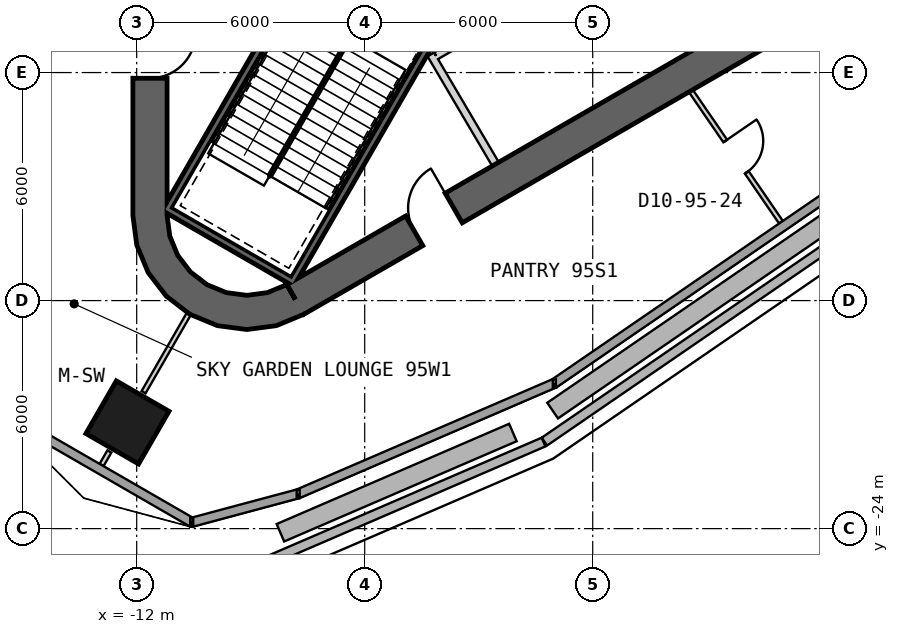
"""IFC4 building model, lengths in metres.
Left out: names, types, materials, properties, quantities, classifications, styles, units other than length and angle.
Written with IfcOpenShell. Run it as: python <this file> out.ifc"""

import sys

from ifc_helpers import new_model, si_unit, direction, frame, frame_2d, origin, origin_2d, place, context, subcontext, project, spatial, polyline, rectangle, outline, extrude, element, fill, save


model = new_model("IFC4")
c1 = context("Model", 3, precision=1e-05, world=origin(), true_north=direction((0.0, 1.0)))
c2 = subcontext(c1, "Body", "Model", "MODEL_VIEW")
j1 = project(units=[si_unit("LENGTHUNIT", "METRE"), si_unit("PLANEANGLEUNIT", "RADIAN")], contexts=[c1])
p1 = place(None, origin())
s1 = spatial("IfcSite", under=j1, at=p1, CompositionType="ELEMENT")
p2 = place(p1, origin())
s2 = spatial("IfcBuilding", under=s1, at=p2, CompositionType="ELEMENT")
p3 = place(p2, frame((0.0, 0.0, 420.3)))
s3 = spatial("IfcBuildingStorey", under=s2, at=p3, CompositionType="ELEMENT", Elevation=420.3)
p4 = place(p3, frame((-12.243, -21.206, -0.25), z_axis=(0.0, 0.0, 1.0), x_axis=(-0.5, -0.866025403784, 0.0)))
e1 = element("IfcColumn", 1, at=p4, inside=s3, PredefinedType="COLUMN", context=c2, shape_type="SweptSolid", body=[
    extrude(rectangle(XDim=1.6, YDim=1.6, at=origin_2d()), origin(), (0.0, 0.0, 1.0), 5.0),
])
p5 = place(p3, frame((-11.65, 15.762, 0.0), z_axis=(0.0, 0.0, 1.0), x_axis=(0.0, -1.0, 0.0)))
e2 = element("IfcWall", 2, at=p5, inside=s3, PredefinedType="SHEAR", context=c2, shape_type="SweptSolid", body=[
    extrude(rectangle(XDim=31.523, YDim=0.9, at=frame_2d((15.762, 0.0))), origin(), (0.0, 0.0, 1.0), 5.0),
])
p6 = place(p5, frame((3.612, 0.0, 0.0)))
e3 = element("IfcOpeningElement", 3, at=p6, cuts=e2, PredefinedType="OPENING", context=c2, shape_type="SweptSolid", body=[
    extrude(rectangle(XDim=1.2, YDim=2.4, at=frame_2d((0.6, 1.2))), frame((0.0, 0.46, 0.0), z_axis=(0.0, -1.0, 0.0), x_axis=(1.0, 0.0, 0.0)), (0.0, 0.0, 1.0), 0.92),
])
p7 = place(p5, frame((26.712, 0.0, 0.0)))
e4 = element("IfcOpeningElement", 4, at=p7, cuts=e2, PredefinedType="OPENING", context=c2, shape_type="SweptSolid", body=[
    extrude(rectangle(XDim=1.2, YDim=2.4, at=frame_2d((0.6, 1.2))), frame((0.0, 0.46, 0.0), z_axis=(0.0, -1.0, 0.0), x_axis=(1.0, 0.0, 0.0)), (0.0, 0.0, 1.0), 0.92),
])
p8 = place(p3, frame((-7.825, -17.97, 0.0), z_axis=(0.0, 0.0, 1.0), x_axis=(0.866028369851, 0.499994862586, 0.0)))
e5 = element("IfcWall", 5, at=p8, inside=s3, PredefinedType="SHEAR", context=c2, shape_type="SweptSolid", body=[
    extrude(rectangle(XDim=31.523, YDim=0.9, at=frame_2d((15.762, 0.0))), origin(), (0.0, 0.0, 1.0), 5.0),
])
p9 = place(p8, frame((17.862, 0.0, 0.0)))
e6 = element("IfcOpeningElement", 6, at=p9, cuts=e5, PredefinedType="OPENING", context=c2, shape_type="SweptSolid", body=[
    extrude(rectangle(XDim=1.2, YDim=2.4, at=frame_2d((0.6, 1.2))), frame((0.0, 0.46, 0.0), z_axis=(0.0, -1.0, 0.0), x_axis=(1.0, 0.0, 0.0)), (0.0, 0.0, 1.0), 0.92),
])
p10 = place(p8, frame((20.562, 0.0, 0.0)))
e7 = element("IfcOpeningElement", 7, at=p10, cuts=e5, PredefinedType="OPENING", context=c2, shape_type="SweptSolid", body=[
    extrude(rectangle(XDim=1.2, YDim=2.4, at=frame_2d((0.6, 1.2))), frame((0.0, 0.46, 0.0), z_axis=(0.0, -1.0, 0.0), x_axis=(1.0, 0.0, 0.0)), (0.0, 0.0, 1.0), 0.92),
])
p11 = place(p8, frame((26.712, 0.0, 0.0)))
e8 = element("IfcOpeningElement", 8, at=p11, cuts=e5, PredefinedType="OPENING", context=c2, shape_type="SweptSolid", body=[
    extrude(rectangle(XDim=1.2, YDim=2.4, at=frame_2d((0.6, 1.2))), frame((0.0, 0.46, 0.0), z_axis=(0.0, -1.0, 0.0), x_axis=(1.0, 0.0, 0.0)), (0.0, 0.0, 1.0), 0.92),
])
p12 = place(p8, frame((3.612, 0.0, 0.0)))
e9 = element("IfcOpeningElement", 9, at=p12, cuts=e5, PredefinedType="OPENING", context=c2, shape_type="SweptSolid", body=[
    extrude(rectangle(XDim=1.2, YDim=2.4, at=frame_2d((0.6, 1.2))), frame((0.0, 0.46, 0.0), z_axis=(0.0, -1.0, 0.0), x_axis=(1.0, 0.0, 0.0)), (0.0, 0.0, 1.0), 0.92),
])
p13 = place(p3, origin())
e10 = element("IfcWall", 10, at=p13, inside=s3, PredefinedType="SHEAR", context=c2, shape_type="SweptSolid", body=[
    extrude(outline(polyline([(-12.1, -15.762), (-11.998, -16.538), (-11.698, -17.262), (-11.221, -17.883), (-10.6, -18.36), (-9.876, -18.659), (-9.1, -18.762), (-8.323, -18.659), (-7.6, -18.36), (-8.05, -17.58), (-8.556, -17.79), (-9.1, -17.862), (-9.644, -17.79), (-10.15, -17.58), (-10.585, -17.247), (-10.919, -16.812), (-11.128, -16.305), (-11.2, -15.762), (-12.1, -15.762)])), origin(), (0.0, 0.0, 1.0), 5.0),
])
p14 = place(p3, frame((-15.365, -21.056, 0.0), z_axis=(0.0, 0.0, 1.0), x_axis=(0.866034164019, -0.499984826521, 0.0)))
e11 = element("IfcWall", 11, at=p14, inside=s3, PredefinedType="SOLIDWALL", context=c2, shape_type="SweptSolid", body=[
    extrude(rectangle(XDim=5.558, YDim=0.24, at=frame_2d((2.779, 0.0))), origin(), (0.0, 0.0, 1.0), 4.75),
])
p15 = place(p3, frame((-10.552, -23.834, 0.0), z_axis=(0.0, 0.0, 1.0), x_axis=(0.965914229844, 0.258862319746, 0.0)))
e12 = element("IfcWall", 12, at=p15, inside=s3, PredefinedType="SOLIDWALL", context=c2, shape_type="SweptSolid", body=[
    extrude(rectangle(XDim=2.9, YDim=0.24, at=frame_2d((1.45, 0.0))), origin(), (0.0, 0.0, 1.0), 4.75),
])
p16 = place(p3, frame((-7.751, -23.084, 0.0), z_axis=(0.0, 0.0, 1.0), x_axis=(0.918310328203, 0.395861264986, 0.0)))
e13 = element("IfcWall", 13, at=p16, inside=s3, PredefinedType="SOLIDWALL", context=c2, shape_type="SweptSolid", body=[
    extrude(rectangle(XDim=7.34, YDim=0.24, at=frame_2d((3.67, 0.0))), origin(), (0.0, 0.0, 1.0), 4.75),
])
p17 = place(p3, frame((-1.01, -20.178, 0.0), z_axis=(0.0, 0.0, 1.0), x_axis=(0.824477208683, 0.565895160221, 0.0)))
e14 = element("IfcWall", 14, at=p17, inside=s3, PredefinedType="SOLIDWALL", context=c2, shape_type="SweptSolid", body=[
    extrude(rectangle(XDim=21.999, YDim=0.24, at=frame_2d((11.0, 0.0))), origin(), (0.0, 0.0, 1.0), 4.75),
])
p18 = place(p3, frame((18.521, -8.125, 0.04), z_axis=(0.0, 0.0, 1.0), x_axis=(-0.82448023265, -0.565890754447, 0.0)))
e15 = element("IfcWall", 15, at=p18, inside=s3, PredefinedType="PARAPET", context=c2, shape_type="SweptSolid", body=[
    extrude(rectangle(XDim=24.007, YDim=0.25, at=frame_2d((12.003, 0.0))), origin(), (0.0, 0.0, 1.0), 1.2),
])
p19 = place(p3, frame((-1.294, -21.723, 0.04), z_axis=(0.0, 0.0, 1.0), x_axis=(-0.918299400713, -0.395886613375, 0.0)))
e16 = element("IfcWall", 16, at=p19, inside=s3, PredefinedType="PARAPET", context=c2, shape_type="SweptSolid", body=[
    extrude(rectangle(XDim=7.934, YDim=0.25, at=frame_2d((3.967, 0.0))), origin(), (0.0, 0.0, 1.0), 1.2),
])
p20 = place(p3, frame((17.769, -7.974, 0.04), z_axis=(0.0, 0.0, 1.0), x_axis=(-0.824477548628, -0.565894664941, 0.0)))
e17 = element("IfcWall", 17, at=p20, inside=s3, PredefinedType="PARAPET", context=c2, shape_type="SweptSolid", body=[
    extrude(rectangle(XDim=22.831, YDim=0.5, at=frame_2d((11.416, 0.0))), origin(), (0.0, 0.0, 1.0), 0.6),
])
p21 = place(p3, frame((-2.1, -21.472, 0.04), z_axis=(0.0, 0.0, 1.0), x_axis=(-0.918314669648, -0.395851193644, 0.0)))
e18 = element("IfcWall", 18, at=p21, inside=s3, PredefinedType="PARAPET", context=c2, shape_type="SweptSolid", body=[
    extrude(rectangle(XDim=6.662, YDim=0.5, at=frame_2d((3.331, 0.0))), origin(), (0.0, 0.0, 1.0), 0.6),
])
p22 = place(p3, frame((-3.905, -10.563, -0.25), z_axis=(0.0, 0.0, 1.0), x_axis=(-0.500012932018, -0.866017937352, 0.0)))
e19 = element("IfcWall", 19, at=p22, inside=s3, PredefinedType="SHEAR", context=c2, shape_type="SweptSolid", body=[
    extrude(rectangle(XDim=8.1, YDim=0.2, at=frame_2d((4.05, 0.0))), origin(), (0.0, 0.0, 1.0), 5.0),
])
p23 = place(p3, frame((-11.282, -15.541, -0.25), z_axis=(0.0, 0.0, 1.0), x_axis=(0.866000483506, -0.500043160704, 0.0)))
e20 = element("IfcWall", 20, at=p23, inside=s3, PredefinedType="SHEAR", context=c2, shape_type="SweptSolid", body=[
    extrude(rectangle(XDim=3.8, YDim=0.2, at=frame_2d((1.9, 0.0))), origin(), (0.0, 0.0, 1.0), 5.0),
])
p24 = place(p3, frame((-7.196, -8.663, -0.25), z_axis=(0.0, 0.0, 1.0), x_axis=(-0.499997992926, -0.866026562566, 0.0)))
e21 = element("IfcWall", 21, at=p24, inside=s3, PredefinedType="SHEAR", context=c2, shape_type="SweptSolid", body=[
    extrude(rectangle(XDim=7.9, YDim=0.2, at=frame_2d((3.95, 0.0))), origin(), (0.0, 0.0, 1.0), 5.0),
])
p25 = place(p3, frame((-4.26, -11.524, 0.0), z_axis=(0.0, 0.0, 1.0), x_axis=(0.507997497166, -0.861358544901, 0.0)))
e22 = element("IfcWall", 22, at=p25, inside=s3, PredefinedType="PARTITIONING", context=c2, shape_type="SweptSolid", body=[
    extrude(rectangle(XDim=3.35, YDim=0.2, at=frame_2d((1.675, 0.0))), origin(), (0.0, 0.0, 1.0), 4.75),
])
p26 = place(p3, frame((-1.024, -9.771, 0.0), z_axis=(0.0, 0.0, 1.0), x_axis=(-0.866029903013, -0.499992207027, 0.0)))
e23 = element("IfcWall", 23, at=p26, inside=s3, PredefinedType="PARTITIONING", context=c2, shape_type="SweptSolid", body=[
    extrude(rectangle(XDim=3.578, YDim=0.2, at=frame_2d((1.789, 0.0))), origin(), (0.0, 0.0, 1.0), 4.75),
])
p27 = place(p3, frame((-12.925, -22.326, 0.0), z_axis=(0.0, 0.0, 1.0), x_axis=(0.499842362059, 0.866116396965, 0.0)))
e24 = element("IfcWall", 24, at=p27, inside=s3, PredefinedType="PARTITIONING", context=c2, shape_type="SweptSolid", body=[
    extrude(rectangle(XDim=0.411, YDim=0.12, at=frame_2d((0.206, 0.0))), origin(), (0.0, 0.0, 1.0), 4.75),
])
p28 = place(p3, frame((-11.819, -20.411, 0.0), z_axis=(0.0, 0.0, 1.0), x_axis=(0.500046963369, 0.865998287773, 0.0)))
e25 = element("IfcWall", 25, at=p28, inside=s3, PredefinedType="PARTITIONING", context=c2, shape_type="SweptSolid", body=[
    extrude(rectangle(XDim=2.54, YDim=0.12, at=frame_2d((1.27, 0.0))), origin(), (0.0, 0.0, 1.0), 2.52),
])
p29 = place(p3, frame((2.581, -12.481, 0.0), z_axis=(0.0, 0.0, 1.0), x_axis=(0.565895333032, -0.824477090071, 0.0)))
e26 = element("IfcWall", 26, at=p29, inside=s3, PredefinedType="PARTITIONING", context=c2, shape_type="SweptSolid", body=[
    extrude(rectangle(XDim=4.188, YDim=0.12, at=frame_2d((2.094, 0.0))), origin(), (0.0, 0.0, 1.0), 4.75),
])
p30 = place(p29, frame((1.6, 0.0, 0.0)))
e27 = element("IfcOpeningElement", 27, at=p30, cuts=e26, PredefinedType="OPENING", context=c2, shape_type="SweptSolid", body=[
    extrude(rectangle(XDim=1.0, YDim=2.1, at=frame_2d((0.5, 1.05))), frame((0.0, 0.07, 0.0), z_axis=(0.0, -1.0, 0.0), x_axis=(1.0, 0.0, 0.0)), (0.0, 0.0, 1.0), 0.14),
])
p31 = place(p30, origin())
e28 = element("IfcDoor", 28, at=p31, inside=s3, OperationType="SINGLE_SWING_LEFT", PredefinedType="NOTDEFINED", context=c2, shape_type="SweptSolid", body=[
    extrude(rectangle(XDim=1.0, YDim=2.1, at=frame_2d((0.5, 1.05))), frame((0.0, 0.025, 0.0), z_axis=(0.0, -1.0, 0.0), x_axis=(1.0, 0.0, 0.0)), (0.0, 0.0, 1.0), 0.05),
])
fill(e27, e28)
p32 = place(p7, origin())
e29 = element("IfcDoor", 29, at=p32, inside=s3, OperationType="SINGLE_SWING_LEFT", PredefinedType="USERDEFINED", context=c2, shape_type="SweptSolid", body=[
    extrude(rectangle(XDim=1.2, YDim=2.4, at=frame_2d((0.6, 1.2))), frame((0.0, 0.025, 0.0), z_axis=(0.0, -1.0, 0.0), x_axis=(1.0, 0.0, 0.0)), (0.0, 0.0, 1.0), 0.05),
])
fill(e4, e29)
p33 = place(p12, origin())
e30 = element("IfcDoor", 30, at=p33, inside=s3, OperationType="SINGLE_SWING_RIGHT", PredefinedType="USERDEFINED", context=c2, shape_type="SweptSolid", body=[
    extrude(rectangle(XDim=1.2, YDim=2.4, at=frame_2d((0.6, 1.2))), frame((0.0, 0.025, 0.0), z_axis=(0.0, -1.0, 0.0), x_axis=(1.0, 0.0, 0.0)), (0.0, 0.0, 1.0), 0.05),
])
fill(e9, e30)
save(model, sys.argv[1])
